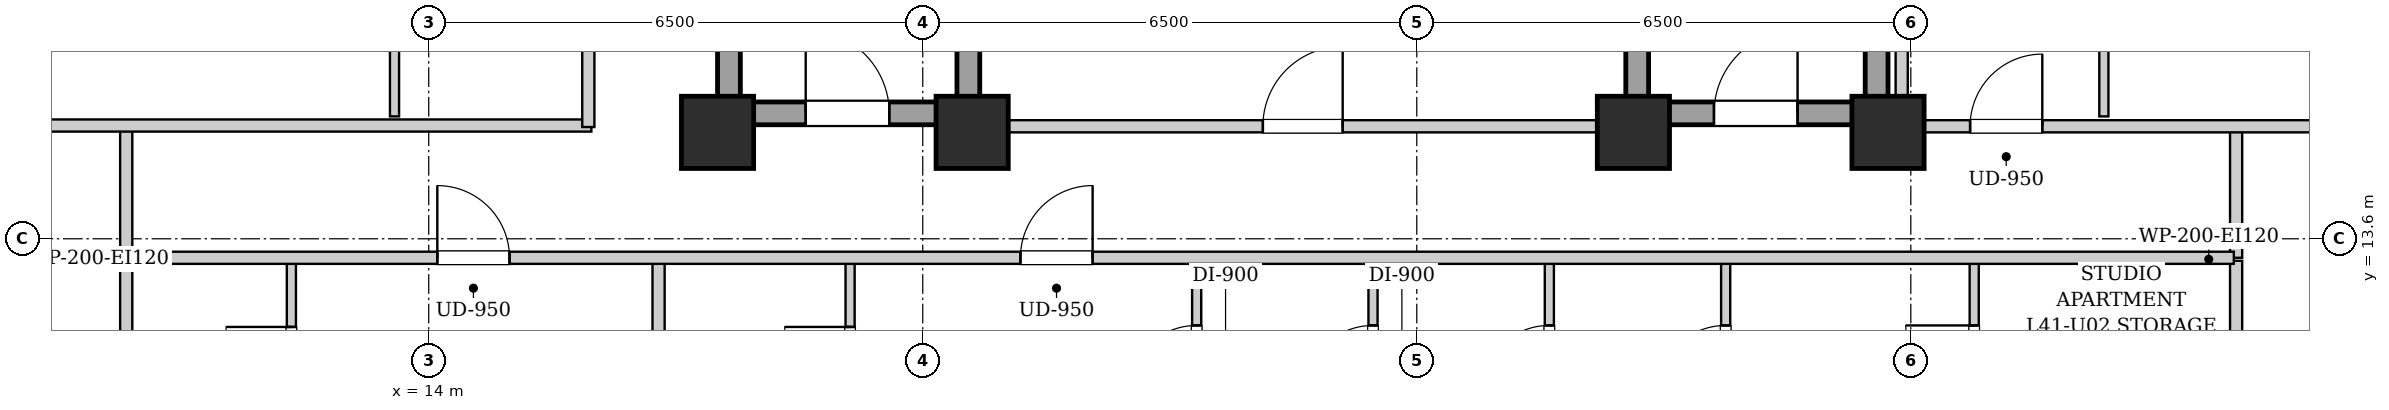
"""IFC4 building model, lengths in metres.
Left out: names, types, materials, properties, quantities, classifications, styles, units other than length and angle.
Written with IfcOpenShell. Run it as: python <this file> out.ifc"""

import sys

from ifc_helpers import new_model, si_unit, direction, frame, frame_2d, origin, origin_2d, place, context, subcontext, project, spatial, rectangle, extrude, element, fill, save


model = new_model("IFC4")
c1 = context("Model", 3, precision=1e-05, world=origin(), true_north=direction((0.0, 1.0)))
c2 = subcontext(c1, "Body", "Model", "MODEL_VIEW")
j1 = project(units=[si_unit("LENGTHUNIT", "METRE"), si_unit("PLANEANGLEUNIT", "RADIAN")], contexts=[c1])
p1 = place(None, origin())
s1 = spatial("IfcSite", under=j1, at=p1, CompositionType="ELEMENT")
p2 = place(p1, origin())
s2 = spatial("IfcBuilding", under=s1, at=p2, CompositionType="ELEMENT")
p3 = place(p2, frame((0.0, 0.0, 143.9)))
s3 = spatial("IfcBuildingStorey", under=s2, at=p3, CompositionType="ELEMENT", Elevation=143.9)
for number, where, z_axis, x_axis in (
    (1, (17.8, 15.0, 0.0), (0.0, 0.0, 1.0), (1.0, 0.0, 0.0)),
    (2, (21.15, 15.0, 0.0), (0.0, 0.0, 1.0), (1.0, 0.0, 0.0)),
    (3, (29.85, 15.0, 0.0), (0.0, 0.0, 1.0), (1.0, 0.0, 0.0)),
    (4, (33.2, 15.0, 0.0), (0.0, 0.0, 1.0), (1.0, 0.0, 0.0)),
):
    element("IfcColumn", number, at=place(p3, frame(where, z_axis=z_axis, x_axis=x_axis)), inside=s3, PredefinedType="COLUMN", context=c2, shape_type="SweptSolid", body=[
        extrude(rectangle(XDim=0.95, YDim=0.95, at=origin_2d()), origin(), (0.0, 0.0, 1.0), 3.25),
    ])
for number, where, z_axis, x_axis in (
    (5, (17.95, 15.1, 0.0), (0.0, 0.0, 1.0), (0.0, 1.0, 0.0)),
    (6, (21.1, 15.1, 0.0), (0.0, 0.0, 1.0), (0.0, 1.0, 0.0)),
):
    element("IfcWall", number, at=place(p3, frame(where, z_axis=z_axis, x_axis=x_axis)), inside=s3, PredefinedType="SHEAR", context=c2, shape_type="SweptSolid", body=[
        extrude(rectangle(XDim=9.0, YDim=0.3, at=frame_2d((4.5, 0.0))), origin(), (0.0, 0.0, 1.0), 2.99),
    ])
p4 = place(p3, frame((18.1, 15.25, 0.0), z_axis=(0.0, 0.0, 1.0), x_axis=(1.0, 0.0, 0.0)))
e7 = element("IfcWall", 7, at=p4, inside=s3, PredefinedType="SHEAR", context=c2, shape_type="SweptSolid", body=[
    extrude(rectangle(XDim=2.85, YDim=0.3, at=frame_2d((1.425, 0.0))), origin(), (0.0, 0.0, 1.0), 2.99),
])
p5 = place(p4, frame((0.86, 0.0, 0.0)))
e8 = element("IfcOpeningElement", 8, at=p5, cuts=e7, PredefinedType="OPENING", context=c2, shape_type="SweptSolid", body=[
    extrude(rectangle(XDim=1.1, YDim=2.05, at=frame_2d((0.55, 1.025))), frame((0.0, 0.16, 0.0), z_axis=(0.0, -1.0, 0.0), x_axis=(1.0, 0.0, 0.0)), (0.0, 0.0, 1.0), 0.32),
])
for number, where, z_axis, x_axis in (
    (9, (29.9, 15.1, 0.0), (0.0, 0.0, 1.0), (0.0, 1.0, 0.0)),
    (10, (33.05, 15.1, 0.0), (0.0, 0.0, 1.0), (0.0, 1.0, 0.0)),
):
    element("IfcWall", number, at=place(p3, frame(where, z_axis=z_axis, x_axis=x_axis)), inside=s3, PredefinedType="SHEAR", context=c2, shape_type="SweptSolid", body=[
        extrude(rectangle(XDim=9.0, YDim=0.3, at=frame_2d((4.5, 0.0))), origin(), (0.0, 0.0, 1.0), 2.99),
    ])
p6 = place(p3, frame((30.05, 15.25, 0.0), z_axis=(0.0, 0.0, 1.0), x_axis=(1.0, 0.0, 0.0)))
e11 = element("IfcWall", 11, at=p6, inside=s3, PredefinedType="SHEAR", context=c2, shape_type="SweptSolid", body=[
    extrude(rectangle(XDim=2.85, YDim=0.3, at=frame_2d((1.425, 0.0))), origin(), (0.0, 0.0, 1.0), 2.99),
])
p7 = place(p6, frame((0.86, 0.0, 0.0)))
e12 = element("IfcOpeningElement", 12, at=p7, cuts=e11, PredefinedType="OPENING", context=c2, shape_type="SweptSolid", body=[
    extrude(rectangle(XDim=1.1, YDim=2.05, at=frame_2d((0.55, 1.025))), frame((0.0, 0.16, 0.0), z_axis=(0.0, -1.0, 0.0), x_axis=(1.0, 0.0, 0.0)), (0.0, 0.0, 1.0), 0.32),
])
p8 = place(p3, frame((21.25, 15.08, 0.0), z_axis=(0.0, 0.0, 1.0), x_axis=(1.0, 0.0, 0.0)))
e13 = element("IfcWall", 13, at=p8, inside=s3, PredefinedType="PARTITIONING", context=c2, shape_type="SweptSolid", body=[
    extrude(rectangle(XDim=8.5, YDim=0.16, at=frame_2d((4.25, 0.0))), origin(), (0.0, 0.0, 1.0), 2.426),
])
p9 = place(p8, frame((3.725, 0.0, 0.0)))
e14 = element("IfcOpeningElement", 14, at=p9, cuts=e13, PredefinedType="OPENING", context=c2, shape_type="SweptSolid", body=[
    extrude(rectangle(XDim=1.05, YDim=2.05, at=frame_2d((0.525, 1.025))), frame((0.0, 0.09, 0.0), z_axis=(0.0, -1.0, 0.0), x_axis=(1.0, 0.0, 0.0)), (0.0, 0.0, 1.0), 0.18),
])
for number, where, z_axis, x_axis in (
    (15, (10.02, 13.35, 0.0), (0.0, 0.0, 1.0), (0.0, 1.0, 0.0)),
    (16, (37.78, 13.35, 0.0), (0.0, 0.0, 1.0), (0.0, 1.0, 0.0)),
):
    element("IfcWall", number, at=place(p3, frame(where, z_axis=z_axis, x_axis=x_axis)), inside=s3, PredefinedType="PARTITIONING", context=c2, shape_type="SweptSolid", body=[
        extrude(rectangle(XDim=1.74, YDim=0.16, at=frame_2d((0.87, 0.0))), origin(), (0.0, 0.0, 1.0), 2.99),
    ])
p10 = place(p3, frame((7.78, 15.09, 0.0), z_axis=(0.0, 0.0, 1.0), x_axis=(1.0, 0.0, 0.0)))
e17 = element("IfcWall", 17, at=p10, inside=s3, PredefinedType="PARTITIONING", context=c2, shape_type="SweptSolid", body=[
    extrude(rectangle(XDim=8.36, YDim=0.16, at=frame_2d((4.18, 0.0))), origin(), (0.0, 0.0, 1.0), 2.426),
])
p11 = place(p3, frame((10.02, 10.65, 0.0), z_axis=(0.0, 0.0, 1.0), x_axis=(0.0, 1.0, 0.0)))
e18 = element("IfcWall", 18, at=p11, inside=s3, PredefinedType="PARTITIONING", context=c2, shape_type="SweptSolid", body=[
    extrude(rectangle(XDim=2.66, YDim=0.16, at=frame_2d((1.33, 0.0))), origin(), (0.0, 0.0, 1.0), 2.99),
])
p12 = place(p3, frame((12.193, 10.71, 0.0), z_axis=(0.0, 0.0, 1.0), x_axis=(0.0, 1.0, 0.0)))
e19 = element("IfcWall", 19, at=p12, inside=s3, PredefinedType="PARTITIONING", context=c2, shape_type="SweptSolid", body=[
    extrude(rectangle(XDim=2.6, YDim=0.12, at=frame_2d((1.3, 0.0))), origin(), (0.0, 0.0, 1.0), 2.99),
])
p13 = place(p12, frame((0.87, 0.0, 0.0)))
e20 = element("IfcOpeningElement", 20, at=p13, cuts=e19, PredefinedType="OPENING", context=c2, shape_type="SweptSolid", body=[
    extrude(rectangle(XDim=0.86, YDim=2.05, at=frame_2d((0.43, 1.025))), frame((0.0, 0.07, 0.0), z_axis=(0.0, -1.0, 0.0), x_axis=(1.0, 0.0, 0.0)), (0.0, 0.0, 1.0), 0.14),
])
p14 = place(p3, frame((37.78, 10.65, 0.0), z_axis=(0.0, 0.0, 1.0), x_axis=(0.0, 1.0, 0.0)))
e21 = element("IfcWall", 21, at=p14, inside=s3, PredefinedType="PARTITIONING", context=c2, shape_type="SweptSolid", body=[
    extrude(rectangle(XDim=2.66, YDim=0.16, at=frame_2d((1.33, 0.0))), origin(), (0.0, 0.0, 1.0), 2.99),
])
p15 = place(p3, frame((17.024, 6.06, 0.0), z_axis=(0.0, 0.0, 1.0), x_axis=(0.0, 1.0, 0.0)))
e22 = element("IfcWall", 22, at=p15, inside=s3, PredefinedType="PARTITIONING", context=c2, shape_type="SweptSolid", body=[
    extrude(rectangle(XDim=7.25, YDim=0.16, at=frame_2d((3.625, 0.0))), origin(), (0.0, 0.0, 1.0), 2.99),
])
p16 = place(p3, frame((19.544, 10.71, 0.0), z_axis=(0.0, 0.0, 1.0), x_axis=(0.0, 1.0, 0.0)))
e23 = element("IfcWall", 23, at=p16, inside=s3, PredefinedType="PARTITIONING", context=c2, shape_type="SweptSolid", body=[
    extrude(rectangle(XDim=2.6, YDim=0.12, at=frame_2d((1.3, 0.0))), origin(), (0.0, 0.0, 1.0), 2.99),
])
p17 = place(p16, frame((0.87, 0.0, 0.0)))
e24 = element("IfcOpeningElement", 24, at=p17, cuts=e23, PredefinedType="OPENING", context=c2, shape_type="SweptSolid", body=[
    extrude(rectangle(XDim=0.86, YDim=2.05, at=frame_2d((0.43, 1.025))), frame((0.0, 0.07, 0.0), z_axis=(0.0, -1.0, 0.0), x_axis=(1.0, 0.0, 0.0)), (0.0, 0.0, 1.0), 0.14),
])
p18 = place(p3, frame((24.104, 10.71, 0.0), z_axis=(0.0, 0.0, 1.0), x_axis=(0.0, 1.0, 0.0)))
e25 = element("IfcWall", 25, at=p18, inside=s3, PredefinedType="PARTITIONING", context=c2, shape_type="SweptSolid", body=[
    extrude(rectangle(XDim=2.6, YDim=0.12, at=frame_2d((1.3, 0.0))), origin(), (0.0, 0.0, 1.0), 2.99),
])
p19 = place(p18, frame((0.85, 0.0, 0.0)))
e26 = element("IfcOpeningElement", 26, at=p19, cuts=e25, PredefinedType="OPENING", context=c2, shape_type="SweptSolid", body=[
    extrude(rectangle(XDim=0.9, YDim=2.05, at=frame_2d((0.45, 1.025))), frame((0.0, 0.07, 0.0), z_axis=(0.0, -1.0, 0.0), x_axis=(1.0, 0.0, 0.0)), (0.0, 0.0, 1.0), 0.14),
])
p20 = place(p3, frame((26.424, 10.71, 0.0), z_axis=(0.0, 0.0, 1.0), x_axis=(0.0, 1.0, 0.0)))
e27 = element("IfcWall", 27, at=p20, inside=s3, PredefinedType="PARTITIONING", context=c2, shape_type="SweptSolid", body=[
    extrude(rectangle(XDim=2.6, YDim=0.12, at=frame_2d((1.3, 0.0))), origin(), (0.0, 0.0, 1.0), 2.99),
])
p21 = place(p20, frame((0.85, 0.0, 0.0)))
e28 = element("IfcOpeningElement", 28, at=p21, cuts=e27, PredefinedType="OPENING", context=c2, shape_type="SweptSolid", body=[
    extrude(rectangle(XDim=0.9, YDim=2.05, at=frame_2d((0.45, 1.025))), frame((0.0, 0.07, 0.0), z_axis=(0.0, -1.0, 0.0), x_axis=(1.0, 0.0, 0.0)), (0.0, 0.0, 1.0), 0.14),
])
p22 = place(p3, frame((28.744, 10.71, 0.0), z_axis=(0.0, 0.0, 1.0), x_axis=(0.0, 1.0, 0.0)))
e29 = element("IfcWall", 29, at=p22, inside=s3, PredefinedType="PARTITIONING", context=c2, shape_type="SweptSolid", body=[
    extrude(rectangle(XDim=2.6, YDim=0.12, at=frame_2d((1.3, 0.0))), origin(), (0.0, 0.0, 1.0), 2.99),
])
p23 = place(p22, frame((0.85, 0.0, 0.0)))
e30 = element("IfcOpeningElement", 30, at=p23, cuts=e29, PredefinedType="OPENING", context=c2, shape_type="SweptSolid", body=[
    extrude(rectangle(XDim=0.9, YDim=2.05, at=frame_2d((0.45, 1.025))), frame((0.0, 0.07, 0.0), z_axis=(0.0, -1.0, 0.0), x_axis=(1.0, 0.0, 0.0)), (0.0, 0.0, 1.0), 0.14),
])
p24 = place(p3, frame((31.064, 10.71, 0.0), z_axis=(0.0, 0.0, 1.0), x_axis=(0.0, 1.0, 0.0)))
e31 = element("IfcWall", 31, at=p24, inside=s3, PredefinedType="PARTITIONING", context=c2, shape_type="SweptSolid", body=[
    extrude(rectangle(XDim=2.6, YDim=0.12, at=frame_2d((1.3, 0.0))), origin(), (0.0, 0.0, 1.0), 2.99),
])
p25 = place(p24, frame((0.85, 0.0, 0.0)))
e32 = element("IfcOpeningElement", 32, at=p25, cuts=e31, PredefinedType="OPENING", context=c2, shape_type="SweptSolid", body=[
    extrude(rectangle(XDim=0.9, YDim=2.05, at=frame_2d((0.45, 1.025))), frame((0.0, 0.07, 0.0), z_axis=(0.0, -1.0, 0.0), x_axis=(1.0, 0.0, 0.0)), (0.0, 0.0, 1.0), 0.14),
])
p26 = place(p3, frame((34.334, 10.71, 0.0), z_axis=(0.0, 0.0, 1.0), x_axis=(0.0, 1.0, 0.0)))
e33 = element("IfcWall", 33, at=p26, inside=s3, PredefinedType="PARTITIONING", context=c2, shape_type="SweptSolid", body=[
    extrude(rectangle(XDim=2.6, YDim=0.12, at=frame_2d((1.3, 0.0))), origin(), (0.0, 0.0, 1.0), 2.99),
])
p27 = place(p26, frame((0.85, 0.0, 0.0)))
e34 = element("IfcOpeningElement", 34, at=p27, cuts=e33, PredefinedType="OPENING", context=c2, shape_type="SweptSolid", body=[
    extrude(rectangle(XDim=0.9, YDim=2.05, at=frame_2d((0.45, 1.025))), frame((0.0, 0.07, 0.0), z_axis=(0.0, -1.0, 0.0), x_axis=(1.0, 0.0, 0.0)), (0.0, 0.0, 1.0), 0.14),
])
p28 = place(p3, frame((13.55, 15.21, 0.0), z_axis=(0.0, 0.0, 1.0), x_axis=(0.0, 1.0, 0.0)))
e35 = element("IfcWall", 35, at=p28, inside=s3, PredefinedType="PARTITIONING", context=c2, shape_type="SweptSolid", body=[
    extrude(rectangle(XDim=1.85, YDim=0.12, at=frame_2d((0.925, 0.0))), origin(), (0.0, 0.0, 1.0), 2.99),
])
p29 = place(p3, frame((33.38, 15.08, 0.0), z_axis=(0.0, 0.0, 1.0), x_axis=(1.0, 0.0, 0.0)))
e36 = element("IfcWall", 36, at=p29, inside=s3, PredefinedType="PARTITIONING", context=c2, shape_type="SweptSolid", body=[
    extrude(rectangle(XDim=6.64, YDim=0.16, at=frame_2d((3.32, 0.0))), origin(), (0.0, 0.0, 1.0), 2.426),
])
p30 = place(p29, frame((0.9, 0.0, 0.0)))
e37 = element("IfcOpeningElement", 37, at=p30, cuts=e36, PredefinedType="OPENING", context=c2, shape_type="SweptSolid", body=[
    extrude(rectangle(XDim=0.95, YDim=2.1, at=frame_2d((0.475, 1.05))), frame((0.0, 0.09, 0.0), z_axis=(0.0, -1.0, 0.0), x_axis=(1.0, 0.0, 0.0)), (0.0, 0.0, 1.0), 0.18),
])
p31 = place(p3, frame((36.04, 15.21, 0.0), z_axis=(0.0, 0.0, 1.0), x_axis=(0.0, 1.0, 0.0)))
e38 = element("IfcWall", 38, at=p31, inside=s3, PredefinedType="PARTITIONING", context=c2, shape_type="SweptSolid", body=[
    extrude(rectangle(XDim=4.308, YDim=0.12, at=frame_2d((2.154, 0.0))), origin(), (0.0, 0.0, 1.0), 2.99),
])
p32 = place(p31, frame((1.704, 0.0, 0.0)))
e39 = element("IfcOpeningElement", 39, at=p32, cuts=e38, PredefinedType="OPENING", context=c2, shape_type="SweptSolid", body=[
    extrude(rectangle(XDim=0.9, YDim=2.05, at=frame_2d((0.45, 1.025))), frame((0.0, 0.07, 0.0), z_axis=(0.0, -1.0, 0.0), x_axis=(1.0, 0.0, 0.0)), (0.0, 0.0, 1.0), 0.14),
])
p33 = place(p3, frame((10.05, 13.35, 0.0), z_axis=(0.0, 0.0, 1.0), x_axis=(1.0, 0.0, 0.0)))
e40 = element("IfcWall", 40, at=p33, inside=s3, PredefinedType="PARTITIONING", context=c2, shape_type="SweptSolid", body=[
    extrude(rectangle(XDim=27.7, YDim=0.16, at=frame_2d((13.85, 0.0))), origin(), (0.0, 0.0, 1.0), 2.99),
])
p34 = place(p33, frame((4.063, 0.0, 0.0)))
e41 = element("IfcOpeningElement", 41, at=p34, cuts=e40, PredefinedType="OPENING", context=c2, shape_type="SweptSolid", body=[
    extrude(rectangle(XDim=0.95, YDim=2.1, at=frame_2d((0.475, 1.05))), frame((0.0, 0.09, 0.0), z_axis=(0.0, -1.0, 0.0), x_axis=(1.0, 0.0, 0.0)), (0.0, 0.0, 1.0), 0.18),
])
p35 = place(p33, frame((11.735, 0.0, 0.0)))
e42 = element("IfcOpeningElement", 42, at=p35, cuts=e40, PredefinedType="OPENING", context=c2, shape_type="SweptSolid", body=[
    extrude(rectangle(XDim=0.95, YDim=2.1, at=frame_2d((0.475, 1.05))), frame((0.0, 0.09, 0.0), z_axis=(0.0, -1.0, 0.0), x_axis=(1.0, 0.0, 0.0)), (0.0, 0.0, 1.0), 0.18),
])
p36 = place(p3, frame((16.1, 15.07, 0.0), z_axis=(0.0, 0.0, 1.0), x_axis=(0.0, 1.0, 0.0)))
e43 = element("IfcWall", 43, at=p36, inside=s3, PredefinedType="PARTITIONING", context=c2, shape_type="SweptSolid", body=[
    extrude(rectangle(XDim=13.93, YDim=0.16, at=frame_2d((6.965, 0.0))), origin(), (0.0, 0.0, 1.0), 2.99),
])
p37 = place(p36, frame((3.608, 0.0, 0.0)))
e44 = element("IfcOpeningElement", 44, at=p37, cuts=e43, PredefinedType="OPENING", context=c2, shape_type="SweptSolid", body=[
    extrude(rectangle(XDim=0.95, YDim=2.1, at=frame_2d((0.475, 1.05))), frame((0.0, 0.09, 0.0), z_axis=(0.0, -1.0, 0.0), x_axis=(1.0, 0.0, 0.0)), (0.0, 0.0, 1.0), 0.18),
])
p38 = place(p36, frame((10.649, 0.0, 0.0)))
e45 = element("IfcOpeningElement", 45, at=p38, cuts=e43, PredefinedType="OPENING", context=c2, shape_type="SweptSolid", body=[
    extrude(rectangle(XDim=0.95, YDim=2.1, at=frame_2d((0.475, 1.05))), frame((0.0, 0.09, 0.0), z_axis=(0.0, -1.0, 0.0), x_axis=(1.0, 0.0, 0.0)), (0.0, 0.0, 1.0), 0.18),
])
p39 = place(p3, frame((33.38, 15.02, 0.0), z_axis=(0.0, 0.0, 1.0), x_axis=(0.0, 1.0, 0.0)))
e46 = element("IfcWall", 46, at=p39, inside=s3, PredefinedType="PARTITIONING", context=c2, shape_type="SweptSolid", body=[
    extrude(rectangle(XDim=13.98, YDim=0.16, at=frame_2d((6.99, 0.0))), origin(), (0.0, 0.0, 1.0), 2.99),
])
p40 = place(p5, origin())
e47 = element("IfcDoor", 47, at=p40, inside=s3, OperationType="SINGLE_SWING_LEFT", PredefinedType="DOOR", context=c2, shape_type="SweptSolid", body=[
    extrude(rectangle(XDim=1.1, YDim=2.05, at=frame_2d((0.55, 1.025))), frame((0.0, 0.025, 0.0), z_axis=(0.0, -1.0, 0.0), x_axis=(1.0, 0.0, 0.0)), (0.0, 0.0, 1.0), 0.05),
])
fill(e8, e47)
p41 = place(p7, origin())
e48 = element("IfcDoor", 48, at=p41, inside=s3, OperationType="SINGLE_SWING_RIGHT", PredefinedType="DOOR", context=c2, shape_type="SweptSolid", body=[
    extrude(rectangle(XDim=1.1, YDim=2.05, at=frame_2d((0.55, 1.025))), frame((0.0, 0.025, 0.0), z_axis=(0.0, -1.0, 0.0), x_axis=(1.0, 0.0, 0.0)), (0.0, 0.0, 1.0), 0.05),
])
fill(e12, e48)
p42 = place(p9, origin())
e49 = element("IfcDoor", 49, at=p42, inside=s3, OperationType="SINGLE_SWING_RIGHT", PredefinedType="DOOR", context=c2, shape_type="SweptSolid", body=[
    extrude(rectangle(XDim=1.05, YDim=2.05, at=frame_2d((0.525, 1.025))), frame((0.0, 0.025, 0.0), z_axis=(0.0, -1.0, 0.0), x_axis=(1.0, 0.0, 0.0)), (0.0, 0.0, 1.0), 0.05),
])
fill(e14, e49)
p43 = place(p13, origin())
e50 = element("IfcDoor", 50, at=p43, inside=s3, OperationType="SINGLE_SWING_RIGHT", PredefinedType="DOOR", context=c2, shape_type="SweptSolid", body=[
    extrude(rectangle(XDim=0.86, YDim=2.05, at=frame_2d((0.43, 1.025))), frame((0.0, 0.025, 0.0), z_axis=(0.0, -1.0, 0.0), x_axis=(1.0, 0.0, 0.0)), (0.0, 0.0, 1.0), 0.05),
])
fill(e20, e50)
p44 = place(p17, origin())
e51 = element("IfcDoor", 51, at=p44, inside=s3, OperationType="SINGLE_SWING_RIGHT", PredefinedType="DOOR", context=c2, shape_type="SweptSolid", body=[
    extrude(rectangle(XDim=0.86, YDim=2.05, at=frame_2d((0.43, 1.025))), frame((0.0, 0.025, 0.0), z_axis=(0.0, -1.0, 0.0), x_axis=(1.0, 0.0, 0.0)), (0.0, 0.0, 1.0), 0.05),
])
fill(e24, e51)
p45 = place(p19, origin())
e52 = element("IfcDoor", 52, at=p45, inside=s3, OperationType="SINGLE_SWING_LEFT", PredefinedType="DOOR", context=c2, shape_type="SweptSolid", body=[
    extrude(rectangle(XDim=0.9, YDim=2.05, at=frame_2d((0.45, 1.025))), frame((0.0, 0.025, 0.0), z_axis=(0.0, -1.0, 0.0), x_axis=(1.0, 0.0, 0.0)), (0.0, 0.0, 1.0), 0.05),
])
fill(e26, e52)
p46 = place(p21, origin())
e53 = element("IfcDoor", 53, at=p46, inside=s3, OperationType="SINGLE_SWING_LEFT", PredefinedType="DOOR", context=c2, shape_type="SweptSolid", body=[
    extrude(rectangle(XDim=0.9, YDim=2.05, at=frame_2d((0.45, 1.025))), frame((0.0, 0.025, 0.0), z_axis=(0.0, -1.0, 0.0), x_axis=(1.0, 0.0, 0.0)), (0.0, 0.0, 1.0), 0.05),
])
fill(e28, e53)
p47 = place(p23, origin())
e54 = element("IfcDoor", 54, at=p47, inside=s3, OperationType="SINGLE_SWING_LEFT", PredefinedType="DOOR", context=c2, shape_type="SweptSolid", body=[
    extrude(rectangle(XDim=0.9, YDim=2.05, at=frame_2d((0.45, 1.025))), frame((0.0, 0.025, 0.0), z_axis=(0.0, -1.0, 0.0), x_axis=(1.0, 0.0, 0.0)), (0.0, 0.0, 1.0), 0.05),
])
fill(e30, e54)
p48 = place(p25, origin())
e55 = element("IfcDoor", 55, at=p48, inside=s3, OperationType="SINGLE_SWING_LEFT", PredefinedType="DOOR", context=c2, shape_type="SweptSolid", body=[
    extrude(rectangle(XDim=0.9, YDim=2.05, at=frame_2d((0.45, 1.025))), frame((0.0, 0.025, 0.0), z_axis=(0.0, -1.0, 0.0), x_axis=(1.0, 0.0, 0.0)), (0.0, 0.0, 1.0), 0.05),
])
fill(e32, e55)
p49 = place(p27, origin())
e56 = element("IfcDoor", 56, at=p49, inside=s3, OperationType="SINGLE_SWING_RIGHT", PredefinedType="DOOR", context=c2, shape_type="SweptSolid", body=[
    extrude(rectangle(XDim=0.9, YDim=2.05, at=frame_2d((0.45, 1.025))), frame((0.0, 0.025, 0.0), z_axis=(0.0, -1.0, 0.0), x_axis=(1.0, 0.0, 0.0)), (0.0, 0.0, 1.0), 0.05),
])
fill(e34, e56)
p50 = place(p30, origin())
e57 = element("IfcDoor", 57, at=p50, inside=s3, OperationType="SINGLE_SWING_RIGHT", PredefinedType="DOOR", context=c2, shape_type="SweptSolid", body=[
    extrude(rectangle(XDim=0.95, YDim=2.1, at=frame_2d((0.475, 1.05))), frame((0.0, 0.025, 0.0), z_axis=(0.0, -1.0, 0.0), x_axis=(1.0, 0.0, 0.0)), (0.0, 0.0, 1.0), 0.05),
])
fill(e37, e57)
p51 = place(p34, origin())
e58 = element("IfcDoor", 58, at=p51, inside=s3, OperationType="SINGLE_SWING_LEFT", PredefinedType="DOOR", context=c2, shape_type="SweptSolid", body=[
    extrude(rectangle(XDim=0.95, YDim=2.1, at=frame_2d((0.475, 1.05))), frame((0.0, 0.025, 0.0), z_axis=(0.0, -1.0, 0.0), x_axis=(1.0, 0.0, 0.0)), (0.0, 0.0, 1.0), 0.05),
])
fill(e41, e58)
p52 = place(p35, origin())
e59 = element("IfcDoor", 59, at=p52, inside=s3, OperationType="SINGLE_SWING_RIGHT", PredefinedType="DOOR", context=c2, shape_type="SweptSolid", body=[
    extrude(rectangle(XDim=0.95, YDim=2.1, at=frame_2d((0.475, 1.05))), frame((0.0, 0.025, 0.0), z_axis=(0.0, -1.0, 0.0), x_axis=(1.0, 0.0, 0.0)), (0.0, 0.0, 1.0), 0.05),
])
fill(e42, e59)
save(model, sys.argv[1])
